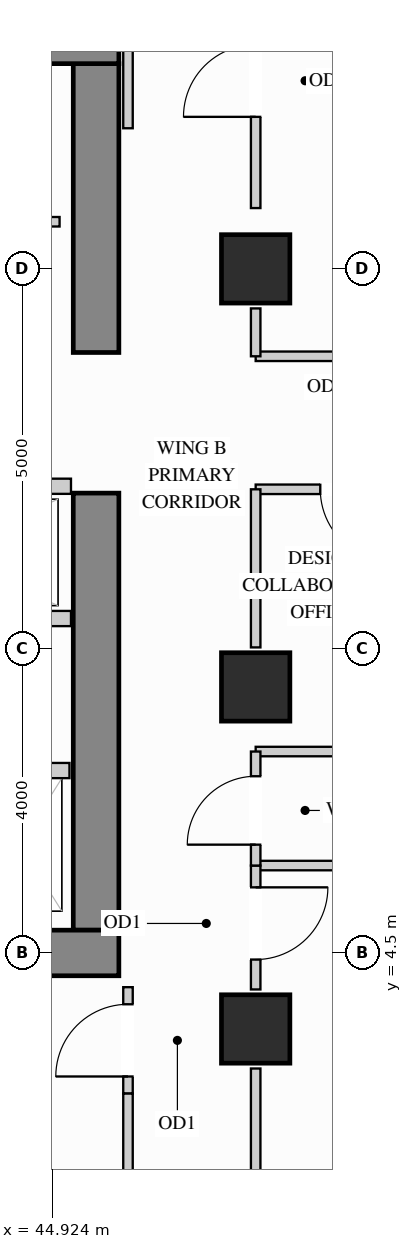
"""IFC4 building model, lengths in metres.
Left out: names, types, materials, properties, quantities, classifications, styles, units other than length and angle.
Written with IfcOpenShell. Run it as: python <this file> out.ifc"""

import sys

from ifc_helpers import new_model, si_unit, direction, frame, frame_2d, origin, origin_2d, place, context, subcontext, project, spatial, rectangle, extrude, source, transform, mapped, element, fill, save


model = new_model("IFC4")
c1 = context("Model", 3, precision=1e-05, world=origin(), true_north=direction((0.0, 1.0)))
c2 = subcontext(c1, "Body", "Model", "MODEL_VIEW")
j1 = project(units=[si_unit("LENGTHUNIT", "METRE"), si_unit("PLANEANGLEUNIT", "RADIAN")], contexts=[c1])
p1 = place(None, origin())
s1 = spatial("IfcSite", under=j1, at=p1, CompositionType="ELEMENT")
p2 = place(p1, origin())
s2 = spatial("IfcBuilding", under=s1, at=p2, CompositionType="ELEMENT")
p3 = place(p2, frame((0.0, 0.0, 197.1)))
s3 = spatial("IfcBuildingStorey", under=s2, at=p3, CompositionType="ELEMENT", Elevation=197.1)
m1 = source(origin(), c2, "Body", "SweptSolid", [
    extrude(rectangle(XDim=0.9, YDim=0.9, at=origin_2d()), origin(), (0.0, 0.0, 1.0), 3.4),
])
for number, where, z_axis, x_axis in (
    (1, (47.6, 13.5, 0.0), (0.0, 0.0, 1.0), (1.0, 0.0, 0.0)),
    (2, (47.6, 3.5, 0.0), (0.0, 0.0, 1.0), (1.0, 0.0, 0.0)),
    (3, (47.6, 8.0, 0.0), (0.0, 0.0, 1.0), (1.0, 0.0, 0.0)),
):
    element("IfcColumn", number, at=place(p3, frame(where, z_axis=z_axis, x_axis=x_axis)), inside=s3, PredefinedType="COLUMN", context=c2, shape_type="MappedRepresentation", body=[
        mapped(m1, transform((0.0, 0.0, 0.0), x_axis=(1.0, 0.0, 0.0), y_axis=(0.0, 1.0, 0.0), z_axis=(0.0, 0.0, 1.0))),
    ])
m2 = source(origin(), c2, "Body", "SweptSolid", [
    extrude(rectangle(XDim=5.75, YDim=0.6, at=frame_2d((2.875, 0.0))), origin(), (0.0, 0.0, 1.0), 3.4),
])
p4 = place(p3, frame((45.5, 4.8, 0.0), z_axis=(0.0, 0.0, 1.0), x_axis=(0.0, 1.0, 0.0)))
e4 = element("IfcWall", 4, at=p4, inside=s3, PredefinedType="SHEAR", context=c2, shape_type="MappedRepresentation", body=[
    mapped(m2, transform((0.0, 0.0, 0.0), x_axis=(1.0, 0.0, 0.0), y_axis=(0.0, 1.0, 0.0), z_axis=(0.0, 0.0, 1.0))),
])
m3 = source(origin(), c2, "Body", "SweptSolid", [
    extrude(rectangle(XDim=3.8, YDim=0.6, at=frame_2d((1.9, 0.0))), origin(), (0.0, 0.0, 1.0), 3.4),
])
p5 = place(p3, frame((45.5, 12.4, 0.0), z_axis=(0.0, 0.0, 1.0), x_axis=(0.0, 1.0, 0.0)))
e5 = element("IfcWall", 5, at=p5, inside=s3, PredefinedType="SHEAR", context=c2, shape_type="MappedRepresentation", body=[
    mapped(m3, transform((0.0, 0.0, 0.0), x_axis=(1.0, 0.0, 0.0), y_axis=(0.0, 1.0, 0.0), z_axis=(0.0, 0.0, 1.0))),
])
m4 = source(origin(), c2, "Body", "SweptSolid", [
    extrude(rectangle(XDim=10.1, YDim=0.6, at=frame_2d((5.05, 0.0))), origin(), (0.0, 0.0, 1.0), 3.4),
])
for number, where, z_axis, x_axis in (
    (6, (35.7, 16.5, 0.0), (0.0, 0.0, 1.0), (1.0, 0.0, 0.0)),
    (7, (35.7, 4.5, 0.0), (0.0, 0.0, 1.0), (1.0, 0.0, 0.0)),
):
    element("IfcWall", number, at=place(p3, frame(where, z_axis=z_axis, x_axis=x_axis)), inside=s3, PredefinedType="SHEAR", context=c2, shape_type="MappedRepresentation", body=[
        mapped(m4, transform((0.0, 0.0, 0.0), x_axis=(1.0, 0.0, 0.0), y_axis=(0.0, 1.0, 0.0), z_axis=(0.0, 0.0, 1.0))),
    ])
p6 = place(p3, frame((41.8, 14.12, 0.0), z_axis=(0.0, 0.0, 1.0), x_axis=(1.0, 0.0, 0.0)))
e8 = element("IfcWall", 8, at=p6, inside=s3, PredefinedType="PARTITIONING", context=c2, shape_type="SweptSolid", body=[
    extrude(rectangle(XDim=3.22, YDim=0.125, at=frame_2d((1.61, 0.0))), origin(), (0.0, 0.0, 1.0), 3.385),
])
p7 = place(p6, frame((1.135, 0.0, 0.0)))
e9 = element("IfcOpeningElement", 9, at=p7, cuts=e8, PredefinedType="OPENING", context=c2, shape_type="SweptSolid", body=[
    extrude(rectangle(XDim=0.85, YDim=2.1, at=frame_2d((0.425, 1.05))), frame((0.0, 0.073, 0.0), z_axis=(0.0, -1.0, 0.0), x_axis=(1.0, 0.0, 0.0)), (0.0, 0.0, 1.0), 0.145),
])
m5 = source(origin(), c2, "Body", "SweptSolid", [
    extrude(rectangle(XDim=5.048, YDim=0.125, at=frame_2d((2.524, 0.0))), origin(), (0.0, 0.0, 1.0), 3.385),
])
for number, where, z_axis, x_axis in (
    (10, (47.6, 5.65, 0.0), (0.0, 0.0, 1.0), (1.0, 0.0, 0.0)),
    (11, (47.6, 7.15, 0.0), (0.0, 0.0, 1.0), (1.0, 0.0, 0.0)),
):
    element("IfcWall", number, at=place(p3, frame(where, z_axis=z_axis, x_axis=x_axis)), inside=s3, PredefinedType="PARTITIONING", context=c2, shape_type="MappedRepresentation", body=[
        mapped(m5, transform((0.0, 0.0, 0.0), x_axis=(1.0, 0.0, 0.0), y_axis=(0.0, 1.0, 0.0), z_axis=(0.0, 0.0, 1.0))),
    ])
m6 = source(origin(), c2, "Body", "SweptSolid", [
    extrude(rectangle(XDim=2.65, YDim=0.125, at=frame_2d((1.325, 0.0))), origin(), (0.0, 0.0, 1.0), 3.385),
])
p8 = place(p3, frame((47.6, 12.35, 0.0), z_axis=(0.0, 0.0, 1.0), x_axis=(1.0, 0.0, 0.0)))
e12 = element("IfcWall", 12, at=p8, inside=s3, PredefinedType="PARTITIONING", context=c2, shape_type="MappedRepresentation", body=[
    mapped(m6, transform((0.0, 0.0, 0.0), x_axis=(1.0, 0.0, 0.0), y_axis=(0.0, 1.0, 0.0), z_axis=(0.0, 0.0, 1.0))),
])
p9 = place(p3, frame((47.6, 10.6, 0.0), z_axis=(0.0, 0.0, 1.0), x_axis=(1.0, 0.0, 0.0)))
e13 = element("IfcWall", 13, at=p9, inside=s3, PredefinedType="PARTITIONING", context=c2, shape_type="SweptSolid", body=[
    extrude(rectangle(XDim=2.65, YDim=0.125, at=frame_2d((1.325, 0.0))), origin(), (0.0, 0.0, 1.0), 2.773),
])
p10 = place(p9, frame((0.85, 0.0, 0.0)))
e14 = element("IfcOpeningElement", 14, at=p10, cuts=e13, PredefinedType="OPENING", context=c2, shape_type="SweptSolid", body=[
    extrude(rectangle(XDim=0.95, YDim=2.15, at=frame_2d((0.475, 1.075))), frame((0.0, 0.073, 0.0), z_axis=(0.0, -1.0, 0.0), x_axis=(1.0, 0.0, 0.0)), (0.0, 0.0, 1.0), 0.145),
])
p11 = place(p3, frame((47.6, 4.02, 0.0), z_axis=(0.0, 0.0, 1.0), x_axis=(0.0, 1.0, 0.0)))
e15 = element("IfcWall", 15, at=p11, inside=s3, PredefinedType="PARTITIONING", context=c2, shape_type="SweptSolid", body=[
    extrude(rectangle(XDim=1.63, YDim=0.125, at=frame_2d((0.815, 0.0))), origin(), (0.0, 0.0, 1.0), 2.773),
])
p12 = place(p11, frame((0.393, 0.0, 0.0)))
e16 = element("IfcOpeningElement", 16, at=p12, cuts=e15, PredefinedType="OPENING", context=c2, shape_type="SweptSolid", body=[
    extrude(rectangle(XDim=0.95, YDim=2.15, at=frame_2d((0.475, 1.075))), frame((0.0, 0.073, 0.0), z_axis=(0.0, -1.0, 0.0), x_axis=(1.0, 0.0, 0.0)), (0.0, 0.0, 1.0), 0.145),
])
m7 = source(origin(), c2, "Body", "SweptSolid", [
    extrude(rectangle(XDim=1.86, YDim=0.125, at=frame_2d((0.93, 0.0))), origin(), (0.0, 0.0, 1.0), 2.773),
])
p13 = place(p3, frame((47.6, 1.12, 0.0), z_axis=(0.0, 0.0, 1.0), x_axis=(0.0, 1.0, 0.0)))
e17 = element("IfcWall", 17, at=p13, inside=s3, PredefinedType="PARTITIONING", context=c2, shape_type="MappedRepresentation", body=[
    mapped(m7, transform((0.0, 0.0, 0.0), x_axis=(1.0, 0.0, 0.0), y_axis=(0.0, 1.0, 0.0), z_axis=(0.0, 0.0, 1.0))),
])
m8 = source(origin(), c2, "Body", "SweptSolid", [
    extrude(rectangle(XDim=2.08, YDim=0.125, at=frame_2d((1.04, 0.0))), origin(), (0.0, 0.0, 1.0), 2.773),
])
p14 = place(p3, frame((47.6, 8.52, 0.0), z_axis=(0.0, 0.0, 1.0), x_axis=(0.0, 1.0, 0.0)))
e18 = element("IfcWall", 18, at=p14, inside=s3, PredefinedType="PARTITIONING", context=c2, shape_type="MappedRepresentation", body=[
    mapped(m8, transform((0.0, 0.0, 0.0), x_axis=(1.0, 0.0, 0.0), y_axis=(0.0, 1.0, 0.0), z_axis=(0.0, 0.0, 1.0))),
])
p15 = place(p3, frame((47.6, 14.3, 0.0), z_axis=(0.0, 0.0, 1.0), x_axis=(0.0, 1.0, 0.0)))
e19 = element("IfcWall", 19, at=p15, inside=s3, PredefinedType="PARTITIONING", context=c2, shape_type="SweptSolid", body=[
    extrude(rectangle(XDim=2.58, YDim=0.125, at=frame_2d((1.29, 0.0))), origin(), (0.0, 0.0, 1.0), 2.773),
])
p16 = place(p15, frame((1.2, 0.0, 0.0)))
e20 = element("IfcOpeningElement", 20, at=p16, cuts=e19, PredefinedType="OPENING", context=c2, shape_type="SweptSolid", body=[
    extrude(rectangle(XDim=0.95, YDim=2.15, at=frame_2d((0.475, 1.075))), frame((0.0, 0.073, 0.0), z_axis=(0.0, -1.0, 0.0), x_axis=(1.0, 0.0, 0.0)), (0.0, 0.0, 1.0), 0.145),
])
m9 = source(origin(), c2, "Body", "SweptSolid", [
    extrude(rectangle(XDim=0.63, YDim=0.125, at=frame_2d((0.315, 0.0))), origin(), (0.0, 0.0, 1.0), 2.773),
])
p17 = place(p3, frame((47.6, 12.35, 0.0), z_axis=(0.0, 0.0, 1.0), x_axis=(0.0, 1.0, 0.0)))
e21 = element("IfcWall", 21, at=p17, inside=s3, PredefinedType="PARTITIONING", context=c2, shape_type="MappedRepresentation", body=[
    mapped(m9, transform((0.0, 0.0, 0.0), x_axis=(1.0, 0.0, 0.0), y_axis=(0.0, 1.0, 0.0), z_axis=(0.0, 0.0, 1.0))),
])
p18 = place(p3, frame((47.6, 5.65, 0.0), z_axis=(0.0, 0.0, 1.0), x_axis=(0.0, 1.0, 0.0)))
e22 = element("IfcWall", 22, at=p18, inside=s3, PredefinedType="PARTITIONING", context=c2, shape_type="SweptSolid", body=[
    extrude(rectangle(XDim=1.5, YDim=0.125, at=frame_2d((0.75, 0.0))), origin(), (0.0, 0.0, 1.0), 2.773),
])
p19 = place(p18, frame((0.275, 0.0, 0.0)))
e23 = element("IfcOpeningElement", 23, at=p19, cuts=e22, PredefinedType="OPENING", context=c2, shape_type="SweptSolid", body=[
    extrude(rectangle(XDim=0.9, YDim=2.15, at=frame_2d((0.45, 1.075))), frame((0.0, 0.073, 0.0), z_axis=(0.0, -1.0, 0.0), x_axis=(1.0, 0.0, 0.0)), (0.0, 0.0, 1.0), 0.145),
])
m10 = source(origin(), c2, "Body", "SweptSolid", [
    extrude(rectangle(XDim=2.298, YDim=0.125, at=frame_2d((1.149, 0.0))), origin(), (0.0, 0.0, 1.0), 3.385),
])
p20 = place(p3, frame((45.92, 15.35, 0.0), z_axis=(0.0, 0.0, 1.0), x_axis=(0.0, 1.0, 0.0)))
e24 = element("IfcWall", 24, at=p20, inside=s3, PredefinedType="PARTITIONING", context=c2, shape_type="MappedRepresentation", body=[
    mapped(m10, transform((0.0, 0.0, 0.0), x_axis=(1.0, 0.0, 0.0), y_axis=(0.0, 1.0, 0.0), z_axis=(0.0, 0.0, 1.0))),
])
p21 = place(p3, frame((45.92, 2.65, 0.0), z_axis=(0.0, 0.0, 1.0), x_axis=(0.0, 1.0, 0.0)))
e25 = element("IfcWall", 25, at=p21, inside=s3, PredefinedType="PARTITIONING", context=c2, shape_type="SweptSolid", body=[
    extrude(rectangle(XDim=1.4, YDim=0.125, at=frame_2d((0.7, 0.0))), origin(), (0.0, 0.0, 1.0), 3.385),
])
p22 = place(p21, frame((0.225, 0.0, 0.0)))
e26 = element("IfcOpeningElement", 26, at=p22, cuts=e25, PredefinedType="OPENING", context=c2, shape_type="SweptSolid", body=[
    extrude(rectangle(XDim=0.95, YDim=2.15, at=frame_2d((0.475, 1.075))), frame((0.0, 0.073, 0.0), z_axis=(0.0, -1.0, 0.0), x_axis=(1.0, 0.0, 0.0)), (0.0, 0.0, 1.0), 0.145),
])
p23 = place(p3, frame((45.92, 0.352, 0.0), z_axis=(0.0, 0.0, 1.0), x_axis=(0.0, 1.0, 0.0)))
e27 = element("IfcWall", 27, at=p23, inside=s3, PredefinedType="PARTITIONING", context=c2, shape_type="MappedRepresentation", body=[
    mapped(m10, transform((0.0, 0.0, 0.0), x_axis=(1.0, 0.0, 0.0), y_axis=(0.0, 1.0, 0.0), z_axis=(0.0, 0.0, 1.0))),
])
m11 = source(origin(), c2, "Body", "SweptSolid", [
    extrude(rectangle(XDim=1.3, YDim=0.2, at=frame_2d((0.65, 0.0))), origin(), (0.0, 0.0, 1.0), 3.385),
])
p24 = place(p3, frame((43.85, 6.9, 0.0), z_axis=(0.0, 0.0, 1.0), x_axis=(1.0, 0.0, 0.0)))
e28 = element("IfcWall", 28, at=p24, inside=s3, PredefinedType="PARTITIONING", context=c2, shape_type="MappedRepresentation", body=[
    mapped(m11, transform((0.0, 0.0, 0.0), x_axis=(1.0, 0.0, 0.0), y_axis=(0.0, 1.0, 0.0), z_axis=(0.0, 0.0, 1.0))),
])
m12 = source(origin(), c2, "Body", "SweptSolid", [
    extrude(rectangle(XDim=3.49, YDim=0.2, at=frame_2d((1.745, 0.0))), origin(), (0.0, 0.0, 1.0), 3.385),
])
for number, where, z_axis, x_axis in (
    (29, (41.68, 10.64, 0.0), (0.0, 0.0, 1.0), (1.0, 0.0, 0.0)),
    (30, (41.68, 8.9, 0.0), (0.0, 0.0, 1.0), (1.0, 0.0, 0.0)),
):
    element("IfcWall", number, at=place(p3, frame(where, z_axis=z_axis, x_axis=x_axis)), inside=s3, PredefinedType="PARTITIONING", context=c2, shape_type="MappedRepresentation", body=[
        mapped(m12, transform((0.0, 0.0, 0.0), x_axis=(1.0, 0.0, 0.0), y_axis=(0.0, 1.0, 0.0), z_axis=(0.0, 0.0, 1.0))),
    ])
m13 = source(origin(), c2, "Body", "SweptSolid", [
    extrude(rectangle(XDim=0.95, YDim=2.15, at=frame_2d((0.475, 1.075))), frame((0.0, 0.025, 0.0), z_axis=(0.0, -1.0, 0.0), x_axis=(1.0, 0.0, 0.0)), (0.0, 0.0, 1.0), 0.05),
])
p25 = place(p22, origin())
e31 = element("IfcDoor", 31, at=p25, inside=s3, OperationType="SINGLE_SWING_LEFT", PredefinedType="DOOR", context=c2, shape_type="MappedRepresentation", body=[
    mapped(m13, transform((0.0, 0.0, 0.0), x_axis=(1.0, 0.0, 0.0), y_axis=(0.0, 1.0, 0.0), z_axis=(0.0, 0.0, 1.0))),
])
fill(e26, e31)
p26 = place(p12, origin())
e32 = element("IfcDoor", 32, at=p26, inside=s3, OperationType="SINGLE_SWING_RIGHT", PredefinedType="DOOR", context=c2, shape_type="MappedRepresentation", body=[
    mapped(m13, transform((0.0, 0.0, 0.0), x_axis=(1.0, 0.0, 0.0), y_axis=(0.0, 1.0, 0.0), z_axis=(0.0, 0.0, 1.0))),
])
fill(e16, e32)
p27 = place(p10, origin())
e33 = element("IfcDoor", 33, at=p27, inside=s3, OperationType="SINGLE_SWING_RIGHT", PredefinedType="DOOR", context=c2, shape_type="MappedRepresentation", body=[
    mapped(m13, transform((0.0, 0.0, 0.0), x_axis=(1.0, 0.0, 0.0), y_axis=(0.0, 1.0, 0.0), z_axis=(0.0, 0.0, 1.0))),
])
fill(e14, e33)
p28 = place(p16, origin())
e34 = element("IfcDoor", 34, at=p28, inside=s3, OperationType="SINGLE_SWING_LEFT", PredefinedType="DOOR", context=c2, shape_type="MappedRepresentation", body=[
    mapped(m13, transform((0.0, 0.0, 0.0), x_axis=(1.0, 0.0, 0.0), y_axis=(0.0, 1.0, 0.0), z_axis=(0.0, 0.0, 1.0))),
])
fill(e20, e34)
m14 = source(origin(), c2, "Body", "SweptSolid", [
    extrude(rectangle(XDim=0.9, YDim=2.15, at=frame_2d((0.45, 1.075))), frame((0.0, 0.025, 0.0), z_axis=(0.0, -1.0, 0.0), x_axis=(1.0, 0.0, 0.0)), (0.0, 0.0, 1.0), 0.05),
])
p29 = place(p19, origin())
e35 = element("IfcDoor", 35, at=p29, inside=s3, OperationType="SINGLE_SWING_LEFT", PredefinedType="DOOR", context=c2, shape_type="MappedRepresentation", body=[
    mapped(m14, transform((0.0, 0.0, 0.0), x_axis=(1.0, 0.0, 0.0), y_axis=(0.0, 1.0, 0.0), z_axis=(0.0, 0.0, 1.0))),
])
fill(e23, e35)
save(model, sys.argv[1])
